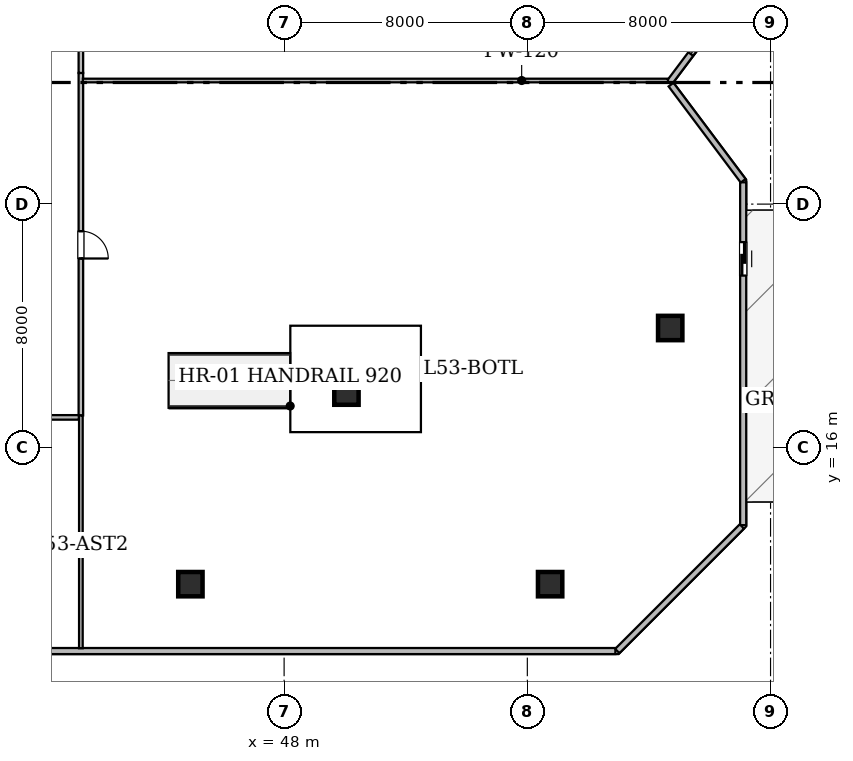
"""IFC4 building model, lengths in metres.
Left out: names, types, materials, properties, quantities, classifications, styles, units other than length and angle.
Written with IfcOpenShell. Run it as: python <this file> out.ifc"""

import sys

from ifc_helpers import new_model, si_unit, direction, frame, frame_2d, origin, origin_2d, place, context, subcontext, project, spatial, rectangle, hollow_rectangle, extrude, element, fill, save


model = new_model("IFC4")
c1 = context("Model", 3, precision=1e-05, world=origin(), true_north=direction((0.0, 1.0)))
c2 = subcontext(c1, "Body", "Model", "MODEL_VIEW")
j1 = project(units=[si_unit("LENGTHUNIT", "METRE"), si_unit("PLANEANGLEUNIT", "RADIAN")], contexts=[c1])
p1 = place(None, origin())
s1 = spatial("IfcSite", under=j1, at=p1, CompositionType="ELEMENT")
p2 = place(p1, origin())
s2 = spatial("IfcBuilding", under=s1, at=p2, CompositionType="ELEMENT")
p3 = place(p2, frame((0.0, 0.0, 207.0)))
s3 = spatial("IfcBuildingStorey", under=s2, at=p3, CompositionType="ELEMENT", Elevation=207.0)
for number, where, z_axis, x_axis in (
    (1, (44.917, 11.5, 0.0), (0.0, 0.0, 1.0), (1.0, 0.0, 0.0)),
    (2, (56.75, 11.5, 0.0), (0.0, 0.0, 1.0), (1.0, 0.0, 0.0)),
    (3, (60.7, 19.925, 0.0), (0.0, 0.0, 1.0), (1.0, 0.0, 0.0)),
    (4, (50.05, 17.8, 0.0), (0.0, 0.0, 1.0), (1.0, 0.0, 0.0)),
):
    element("IfcColumn", number, at=place(p3, frame(where, z_axis=z_axis, x_axis=x_axis)), inside=s3, PredefinedType="COLUMN", context=c2, shape_type="SweptSolid", body=[
        extrude(hollow_rectangle(XDim=0.8, YDim=0.8, WallThickness=0.04, at=origin_2d()), origin(), (0.0, 0.0, 1.0), 4.8),
    ])
p4 = place(p3, frame((63.069, 31.191, 0.0), z_axis=(0.0, 0.0, 1.0), x_axis=(-0.600137081448, -0.799897170561, 0.0)))
e5 = element("IfcWall", 5, at=p4, inside=s3, PredefinedType="STANDARD", context=c2, shape_type="SweptSolid", body=[
    extrude(rectangle(XDim=3.989, YDim=0.2, at=frame_2d((1.995, 0.0))), origin(), (0.0, 0.0, 1.0), 4.48),
])
p5 = place(p4, frame((1.17, 0.0, 0.85)))
e6 = element("IfcOpeningElement", 6, at=p5, cuts=e5, PredefinedType="OPENING", context=c2, shape_type="SweptSolid", body=[
    extrude(rectangle(XDim=1.65, YDim=1.55, at=frame_2d((0.825, 0.775))), frame((0.0, 0.11, 0.0), z_axis=(0.0, -1.0, 0.0), x_axis=(1.0, 0.0, 0.0)), (0.0, 0.0, 1.0), 0.22),
])
p6 = place(p3, frame((60.727, 27.931, 0.0), z_axis=(0.0, 0.0, 1.0), x_axis=(0.600029630681, -0.799977776132, 0.0)))
e7 = element("IfcWall", 7, at=p6, inside=s3, PredefinedType="STANDARD", context=c2, shape_type="SweptSolid", body=[
    extrude(rectangle(XDim=3.955, YDim=0.2, at=frame_2d((1.978, 0.0))), origin(), (0.0, 0.0, 1.0), 4.48),
])
p7 = place(p3, frame((63.1, 24.717, 0.0), z_axis=(0.0, 0.0, 1.0), x_axis=(0.0, -1.0, 0.0)))
e8 = element("IfcWall", 8, at=p7, inside=s3, PredefinedType="STANDARD", context=c2, shape_type="SweptSolid", body=[
    extrude(rectangle(XDim=11.276, YDim=0.2, at=frame_2d((5.638, 0.0))), origin(), (0.0, 0.0, 1.0), 4.48),
])
p8 = place(p7, frame((1.967, 0.0, 0.0)))
e9 = element("IfcOpeningElement", 9, at=p8, cuts=e8, PredefinedType="OPENING", context=c2, shape_type="SweptSolid", body=[
    extrude(rectangle(XDim=1.1, YDim=2.2, at=frame_2d((0.55, 1.1))), frame((0.0, 0.11, 0.0), z_axis=(0.0, -1.0, 0.0), x_axis=(1.0, 0.0, 0.0)), (0.0, 0.0, 1.0), 0.22),
])
p9 = place(p3, frame((63.057, 13.398, 0.0), z_axis=(0.0, 0.0, 1.0), x_axis=(-0.707106781187, -0.707106781187, 0.0)))
e10 = element("IfcWall", 10, at=p9, inside=s3, PredefinedType="STANDARD", context=c2, shape_type="SweptSolid", body=[
    extrude(rectangle(XDim=5.795, YDim=0.2, at=frame_2d((2.898, 0.0))), origin(), (0.0, 0.0, 1.0), 4.48),
])
p10 = place(p3, frame((58.896, 9.3, 0.0), z_axis=(0.0, 0.0, 1.0), x_axis=(-1.0, 0.0, 0.0)))
e11 = element("IfcWall", 11, at=p10, inside=s3, PredefinedType="STANDARD", context=c2, shape_type="SweptSolid", body=[
    extrude(rectangle(XDim=39.793, YDim=0.2, at=frame_2d((19.896, 0.0))), origin(), (0.0, 0.0, 1.0), 4.48),
])
p11 = place(p10, frame((18.921, 0.0, 0.9)))
e12 = element("IfcOpeningElement", 12, at=p11, cuts=e11, PredefinedType="OPENING", context=c2, shape_type="SweptSolid", body=[
    extrude(rectangle(XDim=1.95, YDim=1.65, at=frame_2d((0.975, 0.825))), frame((0.0, 0.11, 0.0), z_axis=(0.0, -1.0, 0.0), x_axis=(1.0, 0.0, 0.0)), (0.0, 0.0, 1.0), 0.22),
])
p12 = place(p3, frame((41.315, 28.314, 0.0), z_axis=(0.0, 0.0, 1.0), x_axis=(0.0, -1.0, 0.0)))
e13 = element("IfcWall", 13, at=p12, inside=s3, PredefinedType="STANDARD", context=c2, shape_type="SweptSolid", body=[
    extrude(rectangle(XDim=11.264, YDim=0.15, at=frame_2d((5.632, 0.0))), origin(), (0.0, 0.0, 1.0), 3.775),
])
p13 = place(p12, frame((5.203, 0.0, 0.0)))
e14 = element("IfcOpeningElement", 14, at=p13, cuts=e13, PredefinedType="OPENING", context=c2, shape_type="SweptSolid", body=[
    extrude(rectangle(XDim=0.9, YDim=2.1, at=frame_2d((0.45, 1.05))), frame((0.0, 0.085, 0.0), z_axis=(0.0, -1.0, 0.0), x_axis=(1.0, 0.0, 0.0)), (0.0, 0.0, 1.0), 0.17),
])
p14 = place(p3, frame((41.315, 33.114, 0.0), z_axis=(0.0, 0.0, 1.0), x_axis=(0.0, -1.0, 0.0)))
e15 = element("IfcWall", 15, at=p14, inside=s3, PredefinedType="STANDARD", context=c2, shape_type="SweptSolid", body=[
    extrude(rectangle(XDim=4.8, YDim=0.15, at=frame_2d((2.4, 0.0))), origin(), (0.0, 0.0, 1.0), 4.007),
])
p15 = place(p14, frame((1.846, 0.0, 0.0)))
e16 = element("IfcOpeningElement", 16, at=p15, cuts=e15, PredefinedType="OPENING", context=c2, shape_type="SweptSolid", body=[
    extrude(rectangle(XDim=1.15, YDim=2.2, at=frame_2d((0.575, 1.1))), frame((0.0, 0.085, 0.0), z_axis=(0.0, -1.0, 0.0), x_axis=(1.0, 0.0, 0.0)), (0.0, 0.0, 1.0), 0.17),
])
p16 = place(p3, frame((41.25, 16.985, 0.0), z_axis=(0.0, 0.0, 1.0), x_axis=(-1.0, 0.0, 0.0)))
e17 = element("IfcWall", 17, at=p16, inside=s3, PredefinedType="STANDARD", context=c2, shape_type="SweptSolid", body=[
    extrude(rectangle(XDim=4.736, YDim=0.15, at=frame_2d((2.368, 0.0))), origin(), (0.0, 0.0, 1.0), 3.775),
])
p17 = place(p16, frame((1.918, 0.0, 0.0)))
e18 = element("IfcOpeningElement", 18, at=p17, cuts=e17, PredefinedType="OPENING", context=c2, shape_type="SweptSolid", body=[
    extrude(rectangle(XDim=0.9, YDim=2.1, at=frame_2d((0.45, 1.05))), frame((0.0, 0.085, 0.0), z_axis=(0.0, -1.0, 0.0), x_axis=(1.0, 0.0, 0.0)), (0.0, 0.0, 1.0), 0.17),
])
p18 = place(p3, frame((41.38, 28.065, 0.0), z_axis=(0.0, 0.0, 1.0), x_axis=(1.0, 0.0, 0.0)))
e19 = element("IfcWall", 19, at=p18, inside=s3, PredefinedType="PARTITIONING", context=c2, shape_type="SweptSolid", body=[
    extrude(rectangle(XDim=19.245, YDim=0.12, at=frame_2d((9.623, 0.0))), origin(), (0.0, 0.0, 1.0), 3.775),
])
p19 = place(p3, frame((41.315, 9.392, 0.0), z_axis=(0.0, 0.0, 1.0), x_axis=(0.0, 1.0, 0.0)))
e20 = element("IfcWall", 20, at=p19, inside=s3, PredefinedType="PARTITIONING", context=c2, shape_type="SweptSolid", body=[
    extrude(rectangle(XDim=7.658, YDim=0.12, at=frame_2d((3.829, 0.0))), origin(), (0.0, 0.0, 1.0), 3.775),
])
p20 = place(p8, origin())
e21 = element("IfcDoor", 21, at=p20, inside=s3, OperationType="SLIDING_TO_LEFT", PredefinedType="DOOR", context=c2, shape_type="SweptSolid", body=[
    extrude(rectangle(XDim=1.1, YDim=2.2, at=frame_2d((0.55, 1.1))), frame((0.0, 0.025, 0.0), z_axis=(0.0, -1.0, 0.0), x_axis=(1.0, 0.0, 0.0)), (0.0, 0.0, 1.0), 0.05),
])
fill(e9, e21)
p21 = place(p5, origin())
e22 = element("IfcWindow", 22, at=p21, inside=s3, PartitioningType="SINGLE_PANEL", PredefinedType="WINDOW", context=c2, shape_type="SweptSolid", body=[
    extrude(rectangle(XDim=1.65, YDim=1.55, at=frame_2d((0.825, 0.775))), frame((0.0, 0.03, 0.0), z_axis=(0.0, -1.0, 0.0), x_axis=(1.0, 0.0, 0.0)), (0.0, 0.0, 1.0), 0.06),
])
fill(e6, e22)
p22 = place(p13, origin())
e23 = element("IfcDoor", 23, at=p22, inside=s3, OperationType="SINGLE_SWING_RIGHT", PredefinedType="DOOR", context=c2, shape_type="SweptSolid", body=[
    extrude(rectangle(XDim=0.9, YDim=2.1, at=frame_2d((0.45, 1.05))), frame((0.0, 0.025, 0.0), z_axis=(0.0, -1.0, 0.0), x_axis=(1.0, 0.0, 0.0)), (0.0, 0.0, 1.0), 0.05),
])
fill(e14, e23)
save(model, sys.argv[1])
